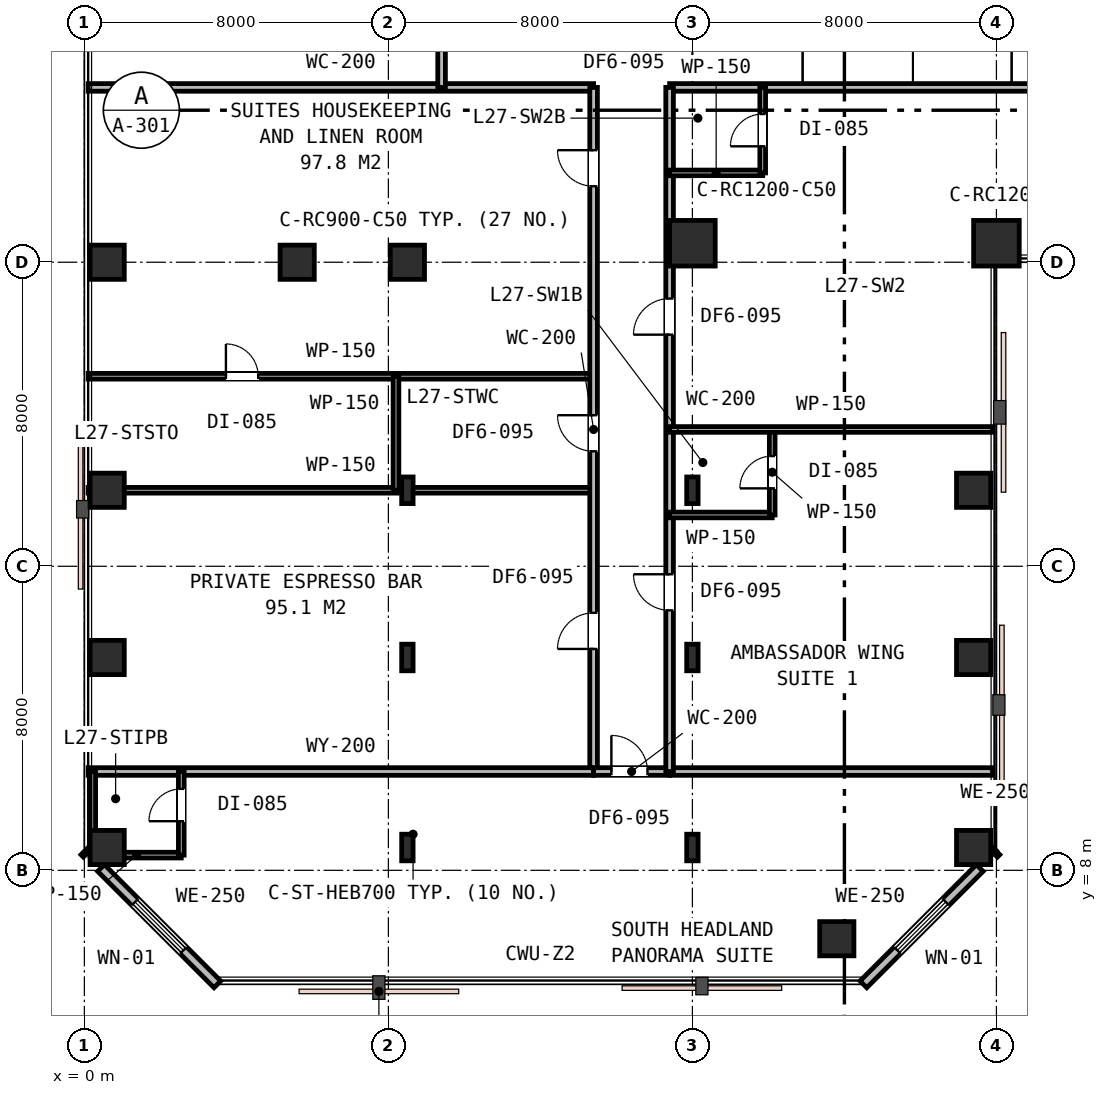
"""IFC4 building model, lengths in metres.
Left out: names, types, materials, properties, quantities, classifications, styles, units other than length and angle.
Written with IfcOpenShell. Run it as: python <this file> out.ifc"""

import sys

from ifc_helpers import new_model, si_unit, direction, frame, frame_2d, origin, origin_2d, place, context, subcontext, project, spatial, rectangle, i_section, extrude, element, fill, save


model = new_model("IFC4")
c1 = context("Model", 3, precision=1e-05, world=origin(), true_north=direction((0.0, 1.0)))
c2 = subcontext(c1, "Body", "Model", "MODEL_VIEW")
j1 = project(units=[si_unit("LENGTHUNIT", "METRE"), si_unit("PLANEANGLEUNIT", "RADIAN")], contexts=[c1])
p1 = place(None, origin())
s1 = spatial("IfcSite", under=j1, at=p1, CompositionType="ELEMENT")
p2 = place(p1, origin())
s2 = spatial("IfcBuilding", under=s1, at=p2, CompositionType="ELEMENT")
p3 = place(p2, frame((0.0, 0.0, 108.0)))
s3 = spatial("IfcBuildingStorey", under=s2, at=p3, CompositionType="ELEMENT", Elevation=108.0)
p4 = place(p3, frame((8.5, 24.0, 0.0), z_axis=(0.0, 0.0, 1.0), x_axis=(1.0, 0.0, 0.0)))
e1 = element("IfcColumn", 1, at=p4, inside=s3, PredefinedType="COLUMN", context=c2, shape_type="SweptSolid", body=[
    extrude(rectangle(XDim=0.9, YDim=0.9, at=origin_2d()), origin(), (0.0, 0.0, 1.0), 3.6),
])
for number, where, z_axis, x_axis in (
    (2, (16.0, 24.5, 0.0), (0.0, 0.0, 1.0), (1.0, 0.0, 0.0)),
    (3, (24.0, 24.5, 0.0), (0.0, 0.0, 1.0), (1.0, 0.0, 0.0)),
):
    element("IfcColumn", number, at=place(p3, frame(where, z_axis=z_axis, x_axis=x_axis)), inside=s3, PredefinedType="COLUMN", context=c2, shape_type="SweptSolid", body=[
        extrude(rectangle(XDim=1.2, YDim=1.2, at=origin_2d()), origin(), (0.0, 0.0, 1.0), 3.6),
    ])
for number, where, z_axis, x_axis in (
    (4, (5.6, 24.0, 0.0), (0.0, 0.0, 1.0), (1.0, 0.0, 0.0)),
    (5, (0.6, 24.0, 0.0), (0.0, 0.0, 1.0), (1.0, 0.0, 0.0)),
    (6, (0.6, 8.6, 0.0), (0.0, 0.0, 1.0), (1.0, 0.0, 0.0)),
    (7, (0.6, 13.6, 0.0), (0.0, 0.0, 1.0), (1.0, 0.0, 0.0)),
    (8, (0.6, 18.0, 0.0), (0.0, 0.0, 1.0), (1.0, 0.0, 0.0)),
    (9, (19.8, 6.2, 0.0), (0.0, 0.0, 1.0), (1.0, 0.0, 0.0)),
    (10, (23.4, 8.6, 0.0), (0.0, 0.0, 1.0), (1.0, 0.0, 0.0)),
    (11, (23.4, 13.6, 0.0), (0.0, 0.0, 1.0), (1.0, 0.0, 0.0)),
    (12, (23.4, 18.0, 0.0), (0.0, 0.0, 1.0), (1.0, 0.0, 0.0)),
):
    element("IfcColumn", number, at=place(p3, frame(where, z_axis=z_axis, x_axis=x_axis)), inside=s3, PredefinedType="COLUMN", context=c2, shape_type="SweptSolid", body=[
        extrude(rectangle(XDim=0.9, YDim=0.9, at=origin_2d()), origin(), (0.0, 0.0, 1.0), 3.6),
    ])
for number, where, z_axis, x_axis in (
    (13, (8.5, 8.6, 0.0), (0.0, 0.0, 1.0), (1.0, 0.0, 0.0)),
    (14, (16.0, 8.6, 0.0), (0.0, 0.0, 1.0), (1.0, 0.0, 0.0)),
    (15, (8.5, 13.6, 0.0), (0.0, 0.0, 1.0), (1.0, 0.0, 0.0)),
    (16, (16.0, 13.6, 0.0), (0.0, 0.0, 1.0), (1.0, 0.0, 0.0)),
    (17, (8.5, 18.0, 0.0), (0.0, 0.0, 1.0), (1.0, 0.0, 0.0)),
    (18, (16.0, 18.0, 0.0), (0.0, 0.0, 1.0), (1.0, 0.0, 0.0)),
):
    element("IfcColumn", number, at=place(p3, frame(where, z_axis=z_axis, x_axis=x_axis)), inside=s3, PredefinedType="COLUMN", context=c2, shape_type="SweptSolid", body=[
        extrude(i_section(OverallWidth=0.3, OverallDepth=0.7, WebThickness=0.017, FlangeThickness=0.032, FilletRadius=0.027, at=origin_2d()), origin(), (0.0, 0.0, 1.0), 3.6),
    ])
p5 = place(p3, frame((20.5, 5.0, 0.0), z_axis=(0.0, 0.0, 1.0), x_axis=(0.707106781187, 0.707106781187, 0.0)))
e19 = element("IfcWall", 19, at=p5, inside=s3, PredefinedType="STANDARD", context=c2, shape_type="SweptSolid", body=[
    extrude(rectangle(XDim=4.33, YDim=0.25, at=frame_2d((2.165, 0.0))), origin(), (0.0, 0.0, 1.0), 3.33),
])
p6 = place(p5, frame((1.265, 0.0, 0.75)))
e20 = element("IfcOpeningElement", 20, at=p6, cuts=e19, PredefinedType="OPENING", context=c2, shape_type="SweptSolid", body=[
    extrude(rectangle(XDim=1.8, YDim=1.85, at=frame_2d((0.9, 0.925))), frame((0.0, 0.135, 0.0), z_axis=(0.0, -1.0, 0.0), x_axis=(1.0, 0.0, 0.0)), (0.0, 0.0, 1.0), 0.27),
])
for number, where, z_axis, x_axis in (
    (21, (23.938, 8.438, 0.0), (0.0, 0.0, 1.0), (0.707, 0.707, 0.0)),
    (22, (0.0, 8.5, 0.0), (0.0, 0.0, 1.0), (0.707, -0.707, 0.0)),
):
    element("IfcWall", number, at=place(p3, frame(where, z_axis=z_axis, x_axis=x_axis)), inside=s3, PredefinedType="STANDARD", context=c2, shape_type="SweptSolid", body=[
        extrude(rectangle(XDim=0.087, YDim=0.25, at=frame_2d((0.044, 0.0))), origin(), (0.0, 0.0, 1.0), 3.33),
    ])
p7 = place(p3, frame((0.438, 8.062, 0.0), z_axis=(0.0, 0.0, 1.0), x_axis=(0.707106781187, -0.707106781187, 0.0)))
e23 = element("IfcWall", 23, at=p7, inside=s3, PredefinedType="STANDARD", context=c2, shape_type="SweptSolid", body=[
    extrude(rectangle(XDim=4.33, YDim=0.25, at=frame_2d((2.165, 0.0))), origin(), (0.0, 0.0, 1.0), 3.33),
])
p8 = place(p7, frame((1.265, 0.0, 0.75)))
e24 = element("IfcOpeningElement", 24, at=p8, cuts=e23, PredefinedType="OPENING", context=c2, shape_type="SweptSolid", body=[
    extrude(rectangle(XDim=1.8, YDim=1.85, at=frame_2d((0.9, 0.925))), frame((0.0, 0.135, 0.0), z_axis=(0.0, -1.0, 0.0), x_axis=(1.0, 0.0, 0.0)), (0.0, 0.0, 1.0), 0.27),
])
p9 = place(p3, frame((0.1, 28.6, 0.0), z_axis=(0.0, 0.0, 1.0), x_axis=(1.0, 0.0, 0.0)))
e25 = element("IfcWall", 25, at=p9, inside=s3, PredefinedType="PARTITIONING", context=c2, shape_type="SweptSolid", body=[
    extrude(rectangle(XDim=13.3, YDim=0.2, at=frame_2d((6.65, 0.0))), origin(), (0.0, 0.0, 1.0), 2.87),
])
p10 = place(p3, frame((15.4, 28.6, 0.0), z_axis=(0.0, 0.0, 1.0), x_axis=(1.0, 0.0, 0.0)))
e26 = element("IfcWall", 26, at=p10, inside=s3, PredefinedType="PARTITIONING", context=c2, shape_type="SweptSolid", body=[
    extrude(rectangle(XDim=28.8, YDim=0.2, at=frame_2d((14.4, 0.0))), origin(), (0.0, 0.0, 1.0), 2.87),
])
p11 = place(p10, frame((12.41, 0.0, 0.0)))
e27 = element("IfcOpeningElement", 27, at=p11, cuts=e26, PredefinedType="OPENING", context=c2, shape_type="SweptSolid", body=[
    extrude(rectangle(XDim=0.95, YDim=2.15, at=frame_2d((0.475, 1.075))), frame((0.0, 0.11, 0.0), z_axis=(0.0, -1.0, 0.0), x_axis=(1.0, 0.0, 0.0)), (0.0, 0.0, 1.0), 0.22),
])
p12 = place(p10, frame((22.68, 0.0, 0.0)))
e28 = element("IfcOpeningElement", 28, at=p12, cuts=e26, PredefinedType="OPENING", context=c2, shape_type="SweptSolid", body=[
    extrude(rectangle(XDim=0.95, YDim=2.15, at=frame_2d((0.475, 1.075))), frame((0.0, 0.11, 0.0), z_axis=(0.0, -1.0, 0.0), x_axis=(1.0, 0.0, 0.0)), (0.0, 0.0, 1.0), 0.22),
])
p13 = place(p3, frame((0.1, 18.0, 0.0), z_axis=(0.0, 0.0, 1.0), x_axis=(1.0, 0.0, 0.0)))
e29 = element("IfcWall", 29, at=p13, inside=s3, PredefinedType="PARTITIONING", context=c2, shape_type="SweptSolid", body=[
    extrude(rectangle(XDim=13.3, YDim=0.15, at=frame_2d((6.65, 0.0))), origin(), (0.0, 0.0, 1.0), 2.87),
])
p14 = place(p3, frame((0.1, 21.0, 0.0), z_axis=(0.0, 0.0, 1.0), x_axis=(1.0, 0.0, 0.0)))
e30 = element("IfcWall", 30, at=p14, inside=s3, PredefinedType="PARTITIONING", context=c2, shape_type="SweptSolid", body=[
    extrude(rectangle(XDim=13.3, YDim=0.15, at=frame_2d((6.65, 0.0))), origin(), (0.0, 0.0, 1.0), 2.87),
])
p15 = place(p14, frame((3.625, 0.0, 0.0)))
e31 = element("IfcOpeningElement", 31, at=p15, cuts=e30, PredefinedType="OPENING", context=c2, shape_type="SweptSolid", body=[
    extrude(rectangle(XDim=0.85, YDim=2.15, at=frame_2d((0.425, 1.075))), frame((0.0, 0.085, 0.0), z_axis=(0.0, -1.0, 0.0), x_axis=(1.0, 0.0, 0.0)), (0.0, 0.0, 1.0), 0.17),
])
p16 = place(p3, frame((8.2, 18.0, 0.0), z_axis=(0.0, 0.0, 1.0), x_axis=(0.0, 1.0, 0.0)))
e32 = element("IfcWall", 32, at=p16, inside=s3, PredefinedType="PARTITIONING", context=c2, shape_type="SweptSolid", body=[
    extrude(rectangle(XDim=3.0, YDim=0.15, at=frame_2d((1.5, 0.0))), origin(), (0.0, 0.0, 1.0), 2.87),
])
p17 = place(p3, frame((13.4, 10.6, 0.0), z_axis=(0.0, 0.0, 1.0), x_axis=(0.0, 1.0, 0.0)))
e33 = element("IfcWall", 33, at=p17, inside=s3, PredefinedType="PARTITIONING", context=c2, shape_type="SweptSolid", body=[
    extrude(rectangle(XDim=18.0, YDim=0.2, at=frame_2d((9.0, 0.0))), origin(), (0.0, 0.0, 1.0), 2.87),
])
p18 = place(p17, frame((8.425, 0.0, 0.0)))
e34 = element("IfcOpeningElement", 34, at=p18, cuts=e33, PredefinedType="OPENING", context=c2, shape_type="SweptSolid", body=[
    extrude(rectangle(XDim=0.95, YDim=2.15, at=frame_2d((0.475, 1.075))), frame((0.0, 0.11, 0.0), z_axis=(0.0, -1.0, 0.0), x_axis=(1.0, 0.0, 0.0)), (0.0, 0.0, 1.0), 0.22),
])
p19 = place(p17, frame((15.399, 0.0, 0.0)))
e35 = element("IfcOpeningElement", 35, at=p19, cuts=e33, PredefinedType="OPENING", context=c2, shape_type="SweptSolid", body=[
    extrude(rectangle(XDim=0.95, YDim=2.15, at=frame_2d((0.475, 1.075))), frame((0.0, 0.11, 0.0), z_axis=(0.0, -1.0, 0.0), x_axis=(1.0, 0.0, 0.0)), (0.0, 0.0, 1.0), 0.22),
])
p20 = place(p17, frame((3.225, 0.0, 0.0)))
e36 = element("IfcOpeningElement", 36, at=p20, cuts=e33, PredefinedType="OPENING", context=c2, shape_type="SweptSolid", body=[
    extrude(rectangle(XDim=0.95, YDim=2.15, at=frame_2d((0.475, 1.075))), frame((0.0, 0.11, 0.0), z_axis=(0.0, -1.0, 0.0), x_axis=(1.0, 0.0, 0.0)), (0.0, 0.0, 1.0), 0.22),
])
p21 = place(p3, frame((9.4, 28.6, 0.0), z_axis=(0.0, 0.0, 1.0), x_axis=(0.0, 1.0, 0.0)))
e37 = element("IfcWall", 37, at=p21, inside=s3, PredefinedType="PARTITIONING", context=c2, shape_type="SweptSolid", body=[
    extrude(rectangle(XDim=12.9, YDim=0.2, at=frame_2d((6.45, 0.0))), origin(), (0.0, 0.0, 1.0), 2.87),
])
p22 = place(p21, frame((3.825, 0.0, 0.0)))
e38 = element("IfcOpeningElement", 38, at=p22, cuts=e37, PredefinedType="OPENING", context=c2, shape_type="SweptSolid", body=[
    extrude(rectangle(XDim=0.95, YDim=2.15, at=frame_2d((0.475, 1.075))), frame((0.0, 0.11, 0.0), z_axis=(0.0, -1.0, 0.0), x_axis=(1.0, 0.0, 0.0)), (0.0, 0.0, 1.0), 0.22),
])
p23 = place(p21, frame((9.175, 0.0, 0.0)))
e39 = element("IfcOpeningElement", 39, at=p23, cuts=e37, PredefinedType="OPENING", context=c2, shape_type="SweptSolid", body=[
    extrude(rectangle(XDim=0.95, YDim=2.15, at=frame_2d((0.475, 1.075))), frame((0.0, 0.11, 0.0), z_axis=(0.0, -1.0, 0.0), x_axis=(1.0, 0.0, 0.0)), (0.0, 0.0, 1.0), 0.22),
])
p24 = place(p3, frame((0.1, 10.6, 0.0), z_axis=(0.0, 0.0, 1.0), x_axis=(1.0, 0.0, 0.0)))
e40 = element("IfcWall", 40, at=p24, inside=s3, PredefinedType="PARTITIONING", context=c2, shape_type="SweptSolid", body=[
    extrude(rectangle(XDim=13.3, YDim=0.2, at=frame_2d((6.65, 0.0))), origin(), (0.0, 0.0, 1.0), 2.87),
])
p25 = place(p3, frame((15.4, 10.6, 0.0), z_axis=(0.0, 0.0, 1.0), x_axis=(1.0, 0.0, 0.0)))
e41 = element("IfcWall", 41, at=p25, inside=s3, PredefinedType="PARTITIONING", context=c2, shape_type="SweptSolid", body=[
    extrude(rectangle(XDim=8.5, YDim=0.2, at=frame_2d((4.25, 0.0))), origin(), (0.0, 0.0, 1.0), 2.87),
])
p26 = place(p3, frame((13.4, 10.6, 0.0), z_axis=(0.0, 0.0, 1.0), x_axis=(1.0, 0.0, 0.0)))
e42 = element("IfcWall", 42, at=p26, inside=s3, PredefinedType="PARTITIONING", context=c2, shape_type="SweptSolid", body=[
    extrude(rectangle(XDim=2.0, YDim=0.2, at=frame_2d((1.0, 0.0))), origin(), (0.0, 0.0, 1.0), 3.01),
])
p27 = place(p26, frame((0.468, 0.0, 0.0)))
e43 = element("IfcOpeningElement", 43, at=p27, cuts=e42, PredefinedType="OPENING", context=c2, shape_type="SweptSolid", body=[
    extrude(rectangle(XDim=0.95, YDim=2.15, at=frame_2d((0.475, 1.075))), frame((0.0, 0.11, 0.0), z_axis=(0.0, -1.0, 0.0), x_axis=(1.0, 0.0, 0.0)), (0.0, 0.0, 1.0), 0.22),
])
p28 = place(p3, frame((0.2, 8.4, 0.0), z_axis=(0.0, 0.0, 1.0), x_axis=(1.0, 0.0, 0.0)))
e44 = element("IfcWall", 44, at=p28, inside=s3, PredefinedType="PARTITIONING", context=c2, shape_type="SweptSolid", body=[
    extrude(rectangle(XDim=2.35, YDim=0.15, at=frame_2d((1.175, 0.0))), origin(), (0.0, 0.0, 1.0), 2.87),
])
p29 = place(p3, frame((2.55, 8.4, 0.0), z_axis=(0.0, 0.0, 1.0), x_axis=(0.0, 1.0, 0.0)))
e45 = element("IfcWall", 45, at=p29, inside=s3, PredefinedType="PARTITIONING", context=c2, shape_type="SweptSolid", body=[
    extrude(rectangle(XDim=2.2, YDim=0.15, at=frame_2d((1.1, 0.0))), origin(), (0.0, 0.0, 1.0), 2.87),
])
p30 = place(p29, frame((0.892, 0.0, 0.0)))
e46 = element("IfcOpeningElement", 46, at=p30, cuts=e45, PredefinedType="OPENING", context=c2, shape_type="SweptSolid", body=[
    extrude(rectangle(XDim=0.85, YDim=2.15, at=frame_2d((0.425, 1.075))), frame((0.0, 0.085, 0.0), z_axis=(0.0, -1.0, 0.0), x_axis=(1.0, 0.0, 0.0)), (0.0, 0.0, 1.0), 0.17),
])
p31 = place(p3, frame((0.22, 8.38, 0.0), z_axis=(0.0, 0.0, 1.0), x_axis=(0.0, 1.0, 0.0)))
e47 = element("IfcWall", 47, at=p31, inside=s3, PredefinedType="PARTITIONING", context=c2, shape_type="SweptSolid", body=[
    extrude(rectangle(XDim=2.22, YDim=0.15, at=frame_2d((1.11, 0.0))), origin(), (0.0, 0.0, 1.0), 2.87),
])
p32 = place(p3, frame((15.4, 10.6, 0.0), z_axis=(0.0, 0.0, 1.0), x_axis=(0.0, 1.0, 0.0)))
e48 = element("IfcWall", 48, at=p32, inside=s3, PredefinedType="PARTITIONING", context=c2, shape_type="SweptSolid", body=[
    extrude(rectangle(XDim=18.0, YDim=0.2, at=frame_2d((9.0, 0.0))), origin(), (0.0, 0.0, 1.0), 2.87),
])
p33 = place(p32, frame((4.24, 0.0, 0.0)))
e49 = element("IfcOpeningElement", 49, at=p33, cuts=e48, PredefinedType="OPENING", context=c2, shape_type="SweptSolid", body=[
    extrude(rectangle(XDim=0.95, YDim=2.15, at=frame_2d((0.475, 1.075))), frame((0.0, 0.11, 0.0), z_axis=(0.0, -1.0, 0.0), x_axis=(1.0, 0.0, 0.0)), (0.0, 0.0, 1.0), 0.22),
])
p34 = place(p32, frame((11.494, 0.0, 0.0)))
e50 = element("IfcOpeningElement", 50, at=p34, cuts=e48, PredefinedType="OPENING", context=c2, shape_type="SweptSolid", body=[
    extrude(rectangle(XDim=0.95, YDim=2.15, at=frame_2d((0.475, 1.075))), frame((0.0, 0.11, 0.0), z_axis=(0.0, -1.0, 0.0), x_axis=(1.0, 0.0, 0.0)), (0.0, 0.0, 1.0), 0.22),
])
p35 = place(p3, frame((15.4, 17.35, 0.0), z_axis=(0.0, 0.0, 1.0), x_axis=(1.0, 0.0, 0.0)))
e51 = element("IfcWall", 51, at=p35, inside=s3, PredefinedType="PARTITIONING", context=c2, shape_type="SweptSolid", body=[
    extrude(rectangle(XDim=2.7, YDim=0.15, at=frame_2d((1.35, 0.0))), origin(), (0.0, 0.0, 1.0), 2.87),
])
p36 = place(p3, frame((18.1, 17.35, 0.0), z_axis=(0.0, 0.0, 1.0), x_axis=(0.0, 1.0, 0.0)))
e52 = element("IfcWall", 52, at=p36, inside=s3, PredefinedType="PARTITIONING", context=c2, shape_type="SweptSolid", body=[
    extrude(rectangle(XDim=2.25, YDim=0.15, at=frame_2d((1.125, 0.0))), origin(), (0.0, 0.0, 1.0), 2.87),
])
p37 = place(p36, frame((0.7, 0.0, 0.0)))
e53 = element("IfcOpeningElement", 53, at=p37, cuts=e52, PredefinedType="OPENING", context=c2, shape_type="SweptSolid", body=[
    extrude(rectangle(XDim=0.85, YDim=2.15, at=frame_2d((0.425, 1.075))), frame((0.0, 0.085, 0.0), z_axis=(0.0, -1.0, 0.0), x_axis=(1.0, 0.0, 0.0)), (0.0, 0.0, 1.0), 0.17),
])
p38 = place(p3, frame((15.4, 19.6, 0.0), z_axis=(0.0, 0.0, 1.0), x_axis=(1.0, 0.0, 0.0)))
e54 = element("IfcWall", 54, at=p38, inside=s3, PredefinedType="PARTITIONING", context=c2, shape_type="SweptSolid", body=[
    extrude(rectangle(XDim=8.5, YDim=0.15, at=frame_2d((4.25, 0.0))), origin(), (0.0, 0.0, 1.0), 2.87),
])
p39 = place(p3, frame((15.4, 26.35, 0.0), z_axis=(0.0, 0.0, 1.0), x_axis=(1.0, 0.0, 0.0)))
e55 = element("IfcWall", 55, at=p39, inside=s3, PredefinedType="PARTITIONING", context=c2, shape_type="SweptSolid", body=[
    extrude(rectangle(XDim=2.45, YDim=0.15, at=frame_2d((1.225, 0.0))), origin(), (0.0, 0.0, 1.0), 2.87),
])
p40 = place(p3, frame((17.85, 26.35, 0.0), z_axis=(0.0, 0.0, 1.0), x_axis=(0.0, 1.0, 0.0)))
e56 = element("IfcWall", 56, at=p40, inside=s3, PredefinedType="PARTITIONING", context=c2, shape_type="SweptSolid", body=[
    extrude(rectangle(XDim=2.25, YDim=0.15, at=frame_2d((1.125, 0.0))), origin(), (0.0, 0.0, 1.0), 3.33),
])
p41 = place(p40, frame((0.7, 0.0, 0.0)))
e57 = element("IfcOpeningElement", 57, at=p41, cuts=e56, PredefinedType="OPENING", context=c2, shape_type="SweptSolid", body=[
    extrude(rectangle(XDim=0.85, YDim=2.15, at=frame_2d((0.425, 1.075))), frame((0.0, 0.085, 0.0), z_axis=(0.0, -1.0, 0.0), x_axis=(1.0, 0.0, 0.0)), (0.0, 0.0, 1.0), 0.17),
])
p42 = place(p6, origin())
e58 = element("IfcWindow", 58, at=p42, inside=s3, PartitioningType="SINGLE_PANEL", PredefinedType="WINDOW", context=c2, shape_type="SweptSolid", body=[
    extrude(rectangle(XDim=1.8, YDim=1.85, at=frame_2d((0.9, 0.925))), frame((0.0, 0.03, 0.0), z_axis=(0.0, -1.0, 0.0), x_axis=(1.0, 0.0, 0.0)), (0.0, 0.0, 1.0), 0.06),
])
fill(e20, e58)
p43 = place(p8, origin())
e59 = element("IfcWindow", 59, at=p43, inside=s3, PartitioningType="SINGLE_PANEL", PredefinedType="WINDOW", context=c2, shape_type="SweptSolid", body=[
    extrude(rectangle(XDim=1.8, YDim=1.85, at=frame_2d((0.9, 0.925))), frame((0.0, 0.03, 0.0), z_axis=(0.0, -1.0, 0.0), x_axis=(1.0, 0.0, 0.0)), (0.0, 0.0, 1.0), 0.06),
])
fill(e24, e59)
p44 = place(p18, origin())
e60 = element("IfcDoor", 60, at=p44, inside=s3, OperationType="SINGLE_SWING_RIGHT", PredefinedType="DOOR", context=c2, shape_type="SweptSolid", body=[
    extrude(rectangle(XDim=0.95, YDim=2.15, at=frame_2d((0.475, 1.075))), frame((0.0, 0.025, 0.0), z_axis=(0.0, -1.0, 0.0), x_axis=(1.0, 0.0, 0.0)), (0.0, 0.0, 1.0), 0.05),
])
fill(e34, e60)
p45 = place(p15, origin())
e61 = element("IfcDoor", 61, at=p45, inside=s3, OperationType="SINGLE_SWING_LEFT", PredefinedType="DOOR", context=c2, shape_type="SweptSolid", body=[
    extrude(rectangle(XDim=0.85, YDim=2.15, at=frame_2d((0.425, 1.075))), frame((0.0, 0.025, 0.0), z_axis=(0.0, -1.0, 0.0), x_axis=(1.0, 0.0, 0.0)), (0.0, 0.0, 1.0), 0.05),
])
fill(e31, e61)
p46 = place(p19, origin())
e62 = element("IfcDoor", 62, at=p46, inside=s3, OperationType="SINGLE_SWING_RIGHT", PredefinedType="DOOR", context=c2, shape_type="SweptSolid", body=[
    extrude(rectangle(XDim=0.95, YDim=2.15, at=frame_2d((0.475, 1.075))), frame((0.0, 0.025, 0.0), z_axis=(0.0, -1.0, 0.0), x_axis=(1.0, 0.0, 0.0)), (0.0, 0.0, 1.0), 0.05),
])
fill(e35, e62)
p47 = place(p20, origin())
e63 = element("IfcDoor", 63, at=p47, inside=s3, OperationType="SINGLE_SWING_LEFT", PredefinedType="DOOR", context=c2, shape_type="SweptSolid", body=[
    extrude(rectangle(XDim=0.95, YDim=2.15, at=frame_2d((0.475, 1.075))), frame((0.0, 0.025, 0.0), z_axis=(0.0, -1.0, 0.0), x_axis=(1.0, 0.0, 0.0)), (0.0, 0.0, 1.0), 0.05),
])
fill(e36, e63)
p48 = place(p27, origin())
e64 = element("IfcDoor", 64, at=p48, inside=s3, OperationType="SINGLE_SWING_LEFT", PredefinedType="DOOR", context=c2, shape_type="SweptSolid", body=[
    extrude(rectangle(XDim=0.95, YDim=2.15, at=frame_2d((0.475, 1.075))), frame((0.0, 0.025, 0.0), z_axis=(0.0, -1.0, 0.0), x_axis=(1.0, 0.0, 0.0)), (0.0, 0.0, 1.0), 0.05),
])
fill(e43, e64)
p49 = place(p30, origin())
e65 = element("IfcDoor", 65, at=p49, inside=s3, OperationType="SINGLE_SWING_LEFT", PredefinedType="DOOR", context=c2, shape_type="SweptSolid", body=[
    extrude(rectangle(XDim=0.85, YDim=2.15, at=frame_2d((0.425, 1.075))), frame((0.0, 0.025, 0.0), z_axis=(0.0, -1.0, 0.0), x_axis=(1.0, 0.0, 0.0)), (0.0, 0.0, 1.0), 0.05),
])
fill(e46, e65)
p50 = place(p33, origin())
e66 = element("IfcDoor", 66, at=p50, inside=s3, OperationType="SINGLE_SWING_RIGHT", PredefinedType="DOOR", context=c2, shape_type="SweptSolid", body=[
    extrude(rectangle(XDim=0.95, YDim=2.15, at=frame_2d((0.475, 1.075))), frame((0.0, 0.025, 0.0), z_axis=(0.0, -1.0, 0.0), x_axis=(1.0, 0.0, 0.0)), (0.0, 0.0, 1.0), 0.05),
])
fill(e49, e66)
p51 = place(p37, origin())
e67 = element("IfcDoor", 67, at=p51, inside=s3, OperationType="SINGLE_SWING_LEFT", PredefinedType="DOOR", context=c2, shape_type="SweptSolid", body=[
    extrude(rectangle(XDim=0.85, YDim=2.15, at=frame_2d((0.425, 1.075))), frame((0.0, 0.025, 0.0), z_axis=(0.0, -1.0, 0.0), x_axis=(1.0, 0.0, 0.0)), (0.0, 0.0, 1.0), 0.05),
])
fill(e53, e67)
p52 = place(p34, origin())
e68 = element("IfcDoor", 68, at=p52, inside=s3, OperationType="SINGLE_SWING_LEFT", PredefinedType="DOOR", context=c2, shape_type="SweptSolid", body=[
    extrude(rectangle(XDim=0.95, YDim=2.15, at=frame_2d((0.475, 1.075))), frame((0.0, 0.025, 0.0), z_axis=(0.0, -1.0, 0.0), x_axis=(1.0, 0.0, 0.0)), (0.0, 0.0, 1.0), 0.05),
])
fill(e50, e68)
p53 = place(p41, origin())
e69 = element("IfcDoor", 69, at=p53, inside=s3, OperationType="SINGLE_SWING_LEFT", PredefinedType="DOOR", context=c2, shape_type="SweptSolid", body=[
    extrude(rectangle(XDim=0.85, YDim=2.15, at=frame_2d((0.425, 1.075))), frame((0.0, 0.025, 0.0), z_axis=(0.0, -1.0, 0.0), x_axis=(1.0, 0.0, 0.0)), (0.0, 0.0, 1.0), 0.05),
])
fill(e57, e69)
save(model, sys.argv[1])
